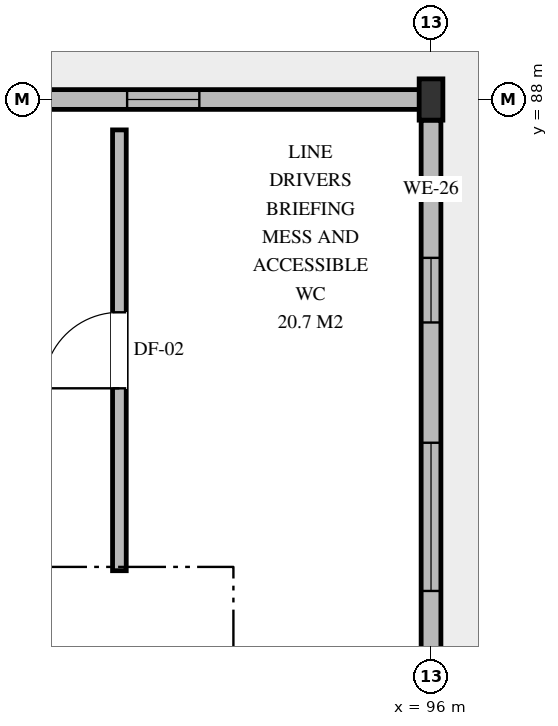
"""IFC4 building model, lengths in metres.
Left out: names, types, materials, properties, quantities, classifications, styles, units other than length and angle.
Written with IfcOpenShell. Run it as: python <this file> out.ifc"""

import sys

from ifc_helpers import new_model, si_unit, direction, frame, frame_2d, origin, origin_2d, place, context, subcontext, project, spatial, rectangle, i_section, extrude, element, fill, save


model = new_model("IFC4")
c1 = context("Model", 3, precision=1e-05, world=origin(), true_north=direction((0.0, 1.0)))
c2 = subcontext(c1, "Body", "Model", "MODEL_VIEW")
j1 = project(units=[si_unit("LENGTHUNIT", "METRE"), si_unit("PLANEANGLEUNIT", "RADIAN")], contexts=[c1])
p1 = place(None, origin())
s1 = spatial("IfcSite", under=j1, at=p1, CompositionType="ELEMENT")
p2 = place(p1, origin())
s2 = spatial("IfcBuilding", under=s1, at=p2, CompositionType="ELEMENT")
p3 = place(p2, frame((0.0, 0.0, 15.0)))
s3 = spatial("IfcBuildingStorey", under=s2, at=p3, CompositionType="ELEMENT", Elevation=15.0)
p4 = place(p3, frame((96.0, 88.0, 0.0), z_axis=(0.0, 0.0, 1.0), x_axis=(1.0, 0.0, 0.0)))
e1 = element("IfcColumn", 1, at=p4, inside=s3, PredefinedType="COLUMN", context=c2, shape_type="SweptSolid", body=[
    extrude(i_section(OverallWidth=0.312, OverallDepth=0.543, WebThickness=0.013, FlangeThickness=0.02, FilletRadius=0.016, at=origin_2d()), origin(), (0.0, 0.0, 1.0), 4.8),
])
p5 = place(p3, frame((80.006, 88.0, 0.0), z_axis=(0.0, 0.0, 1.0), x_axis=(1.0, 0.0, 0.0)))
e2 = element("IfcWall", 2, at=p5, inside=s3, PredefinedType="STANDARD", context=c2, shape_type="SweptSolid", body=[
    extrude(rectangle(XDim=15.988, YDim=0.26, at=frame_2d((7.994, 0.0))), origin(), (0.0, 0.0, 1.0), 4.5),
])
p6 = place(p5, frame((8.798, 0.0, 0.78)))
e3 = element("IfcOpeningElement", 3, at=p6, cuts=e2, PredefinedType="OPENING", context=c2, shape_type="SweptSolid", body=[
    extrude(rectangle(XDim=0.95, YDim=2.6, at=frame_2d((0.475, 1.3))), frame((0.0, 0.14, 0.0), z_axis=(0.0, -1.0, 0.0), x_axis=(1.0, 0.0, 0.0)), (0.0, 0.0, 1.0), 0.28),
])
p7 = place(p5, frame((11.996, 0.0, 0.78)))
e4 = element("IfcOpeningElement", 4, at=p7, cuts=e2, PredefinedType="OPENING", context=c2, shape_type="SweptSolid", body=[
    extrude(rectangle(XDim=0.95, YDim=2.6, at=frame_2d((0.475, 1.3))), frame((0.0, 0.14, 0.0), z_axis=(0.0, -1.0, 0.0), x_axis=(1.0, 0.0, 0.0)), (0.0, 0.0, 1.0), 0.28),
])
p8 = place(p5, frame((3.2, 0.0, 0.0)))
e5 = element("IfcOpeningElement", 5, at=p8, cuts=e2, PredefinedType="OPENING", context=c2, shape_type="SweptSolid", body=[
    extrude(rectangle(XDim=1.05, YDim=2.25, at=frame_2d((0.525, 1.125))), frame((0.0, 0.14, 0.0), z_axis=(0.0, -1.0, 0.0), x_axis=(1.0, 0.0, 0.0)), (0.0, 0.0, 1.0), 0.28),
])
p9 = place(p3, frame((96.0, 87.729, 0.0), z_axis=(0.0, 0.0, 1.0), x_axis=(0.0, -1.0, 0.0)))
e6 = element("IfcWall", 6, at=p9, inside=s3, PredefinedType="STANDARD", context=c2, shape_type="SweptSolid", body=[
    extrude(rectangle(XDim=7.457, YDim=0.26, at=frame_2d((3.729, 0.0))), origin(), (0.0, 0.0, 1.0), 4.5),
])
p10 = place(p9, frame((1.812, 0.0, 0.78)))
e7 = element("IfcOpeningElement", 7, at=p10, cuts=e6, PredefinedType="OPENING", context=c2, shape_type="SweptSolid", body=[
    extrude(rectangle(XDim=0.85, YDim=2.4, at=frame_2d((0.425, 1.2))), frame((0.0, 0.14, 0.0), z_axis=(0.0, -1.0, 0.0), x_axis=(1.0, 0.0, 0.0)), (0.0, 0.0, 1.0), 0.28),
])
p11 = place(p9, frame((4.245, 0.0, 0.78)))
e8 = element("IfcOpeningElement", 8, at=p11, cuts=e6, PredefinedType="OPENING", context=c2, shape_type="SweptSolid", body=[
    extrude(rectangle(XDim=1.95, YDim=2.25, at=frame_2d((0.975, 1.125))), frame((0.0, 0.14, 0.0), z_axis=(0.0, -1.0, 0.0), x_axis=(1.0, 0.0, 0.0)), (0.0, 0.0, 1.0), 0.28),
])
p12 = place(p3, frame((91.9, 81.8, 0.0), z_axis=(0.0, 0.0, 1.0), x_axis=(0.0, 1.0, 0.0)))
e9 = element("IfcWall", 9, at=p12, inside=s3, PredefinedType="PARTITIONING", context=c2, shape_type="SweptSolid", body=[
    extrude(rectangle(XDim=5.8, YDim=0.18, at=frame_2d((2.9, 0.0))), origin(), (0.0, 0.0, 1.0), 4.48),
])
p13 = place(p12, frame((2.4, 0.0, 0.0)))
e10 = element("IfcOpeningElement", 10, at=p13, cuts=e9, PredefinedType="OPENING", context=c2, shape_type="SweptSolid", body=[
    extrude(rectangle(XDim=1.0, YDim=2.15, at=frame_2d((0.5, 1.075))), frame((0.0, 0.1, 0.0), z_axis=(0.0, -1.0, 0.0), x_axis=(1.0, 0.0, 0.0)), (0.0, 0.0, 1.0), 0.2),
])
p14 = place(p7, origin())
e11 = element("IfcWindow", 11, at=p14, inside=s3, PartitioningType="SINGLE_PANEL", PredefinedType="WINDOW", context=c2, shape_type="SweptSolid", body=[
    extrude(rectangle(XDim=0.95, YDim=2.6, at=frame_2d((0.475, 1.3))), frame((0.0, 0.03, 0.0), z_axis=(0.0, -1.0, 0.0), x_axis=(1.0, 0.0, 0.0)), (0.0, 0.0, 1.0), 0.06),
])
fill(e4, e11)
p15 = place(p10, origin())
e12 = element("IfcWindow", 12, at=p15, inside=s3, PartitioningType="SINGLE_PANEL", PredefinedType="WINDOW", context=c2, shape_type="SweptSolid", body=[
    extrude(rectangle(XDim=0.85, YDim=2.4, at=frame_2d((0.425, 1.2))), frame((0.0, 0.03, 0.0), z_axis=(0.0, -1.0, 0.0), x_axis=(1.0, 0.0, 0.0)), (0.0, 0.0, 1.0), 0.06),
])
fill(e7, e12)
p16 = place(p11, origin())
e13 = element("IfcWindow", 13, at=p16, inside=s3, PartitioningType="SINGLE_PANEL", PredefinedType="WINDOW", context=c2, shape_type="SweptSolid", body=[
    extrude(rectangle(XDim=1.95, YDim=2.25, at=frame_2d((0.975, 1.125))), frame((0.0, 0.03, 0.0), z_axis=(0.0, -1.0, 0.0), x_axis=(1.0, 0.0, 0.0)), (0.0, 0.0, 1.0), 0.06),
])
fill(e8, e13)
p17 = place(p13, origin())
e14 = element("IfcDoor", 14, at=p17, inside=s3, OperationType="SINGLE_SWING_LEFT", PredefinedType="DOOR", context=c2, shape_type="SweptSolid", body=[
    extrude(rectangle(XDim=1.0, YDim=2.15, at=frame_2d((0.5, 1.075))), frame((0.0, 0.025, 0.0), z_axis=(0.0, -1.0, 0.0), x_axis=(1.0, 0.0, 0.0)), (0.0, 0.0, 1.0), 0.05),
])
fill(e10, e14)
save(model, sys.argv[1])
